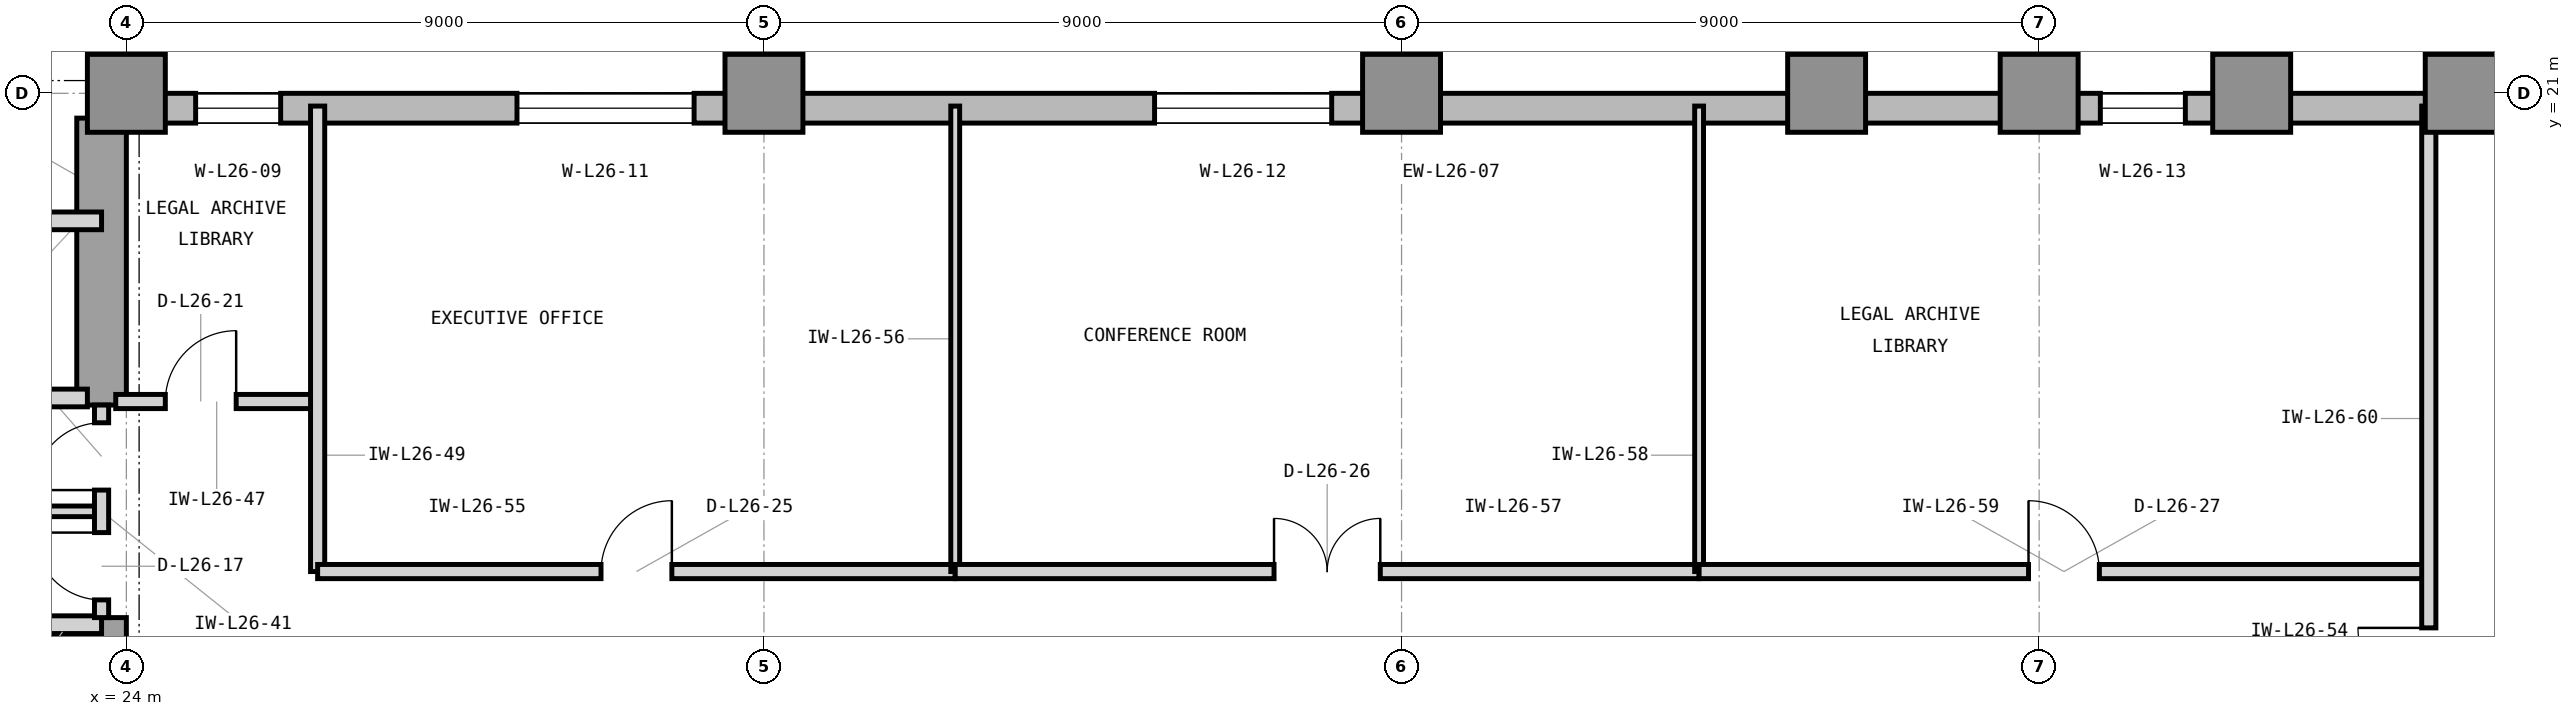
"""IFC4 building model, lengths in metres.
Left out: names, types, materials, properties, quantities, classifications, styles, units other than length and angle.
Written with IfcOpenShell. Run it as: python <this file> out.ifc"""

import sys

from ifc_helpers import new_model, si_unit, direction, frame, frame_2d, origin, origin_2d, place, context, subcontext, project, spatial, rectangle, extrude, element, fill, save


model = new_model("IFC4")
c1 = context("Model", 3, precision=1e-05, world=origin(), true_north=direction((0.0, 1.0)))
c2 = subcontext(c1, "Body", "Model", "MODEL_VIEW")
j1 = project(units=[si_unit("LENGTHUNIT", "METRE"), si_unit("PLANEANGLEUNIT", "RADIAN")], contexts=[c1])
p1 = place(None, origin())
s1 = spatial("IfcSite", under=j1, at=p1, CompositionType="ELEMENT")
p2 = place(p1, origin())
s2 = spatial("IfcBuilding", under=s1, at=p2, CompositionType="ELEMENT")
p3 = place(p2, frame((0.0, 0.0, 112.8)))
s3 = spatial("IfcBuildingStorey", under=s2, at=p3, CompositionType="ELEMENT", Elevation=112.8)
p4 = place(p3, frame((23.65, 10.4, 0.0), z_axis=(0.0, 0.0, 1.0), x_axis=(0.0, 1.0, 0.0)))
e1 = element("IfcWall", 1, at=p4, inside=s3, PredefinedType="SHEAR", context=c2, shape_type="SweptSolid", body=[
    extrude(rectangle(XDim=3.2, YDim=0.7, at=frame_2d((1.6, 0.0))), origin(), (0.0, 0.0, 1.0), 3.9),
])
p5 = place(p3, frame((23.65, 16.6, 0.0), z_axis=(0.0, 0.0, 1.0), x_axis=(0.0, 1.0, 0.0)))
e2 = element("IfcWall", 2, at=p5, inside=s3, PredefinedType="SHEAR", context=c2, shape_type="SweptSolid", body=[
    extrude(rectangle(XDim=4.05, YDim=0.7, at=frame_2d((2.025, 0.0))), origin(), (0.0, 0.0, 1.0), 3.9),
])
for number, where, z_axis, x_axis in (
    (3, (24.0, 21.0, 0.0), (0.0, 0.0, 1.0), (1.0, 0.0, 0.0)),
    (4, (33.0, 21.0, 0.0), (0.0, 0.0, 1.0), (1.0, 0.0, 0.0)),
    (5, (42.0, 21.0, 0.0), (0.0, 0.0, 1.0), (1.0, 0.0, 0.0)),
    (6, (48.0, 21.0, 0.0), (0.0, 0.0, 1.0), (1.0, 0.0, 0.0)),
    (7, (51.0, 21.0, 0.0), (0.0, 0.0, 1.0), (1.0, 0.0, 0.0)),
    (8, (54.0, 21.0, 0.0), (0.0, 0.0, 1.0), (1.0, 0.0, 0.0)),
    (9, (57.0, 21.0, 0.0), (0.0, 0.0, 1.0), (1.0, 0.0, 0.0)),
):
    element("IfcColumn", number, at=place(p3, frame(where, z_axis=z_axis, x_axis=x_axis)), inside=s3, PredefinedType="COLUMN", context=c2, shape_type="SweptSolid", body=[
        extrude(rectangle(XDim=1.1, YDim=1.1, at=origin_2d()), origin(), (0.0, 0.0, 1.0), 3.9),
    ])
p6 = place(p3, frame((61.4, 20.79, 0.0), z_axis=(0.0, 0.0, 1.0), x_axis=(-1.0, 0.0, 0.0)))
e10 = element("IfcWall", 10, at=p6, inside=s3, PredefinedType="STANDARD", context=c2, shape_type="SweptSolid", body=[
    extrude(rectangle(XDim=37.4, YDim=0.42, at=frame_2d((18.7, 0.0))), origin(), (0.0, 0.0, 1.0), 3.7),
])
p7 = place(p6, frame((35.222, 0.0, 0.85)))
e11 = element("IfcOpeningElement", 11, at=p7, cuts=e10, PredefinedType="OPENING", context=c2, shape_type="SweptSolid", body=[
    extrude(rectangle(XDim=1.2, YDim=2.25, at=frame_2d((0.6, 1.125))), frame((0.0, 0.22, 0.0), z_axis=(0.0, -1.0, 0.0), x_axis=(1.0, 0.0, 0.0)), (0.0, 0.0, 1.0), 0.44),
])
p8 = place(p6, frame((29.386, 0.0, 0.85)))
e12 = element("IfcOpeningElement", 12, at=p8, cuts=e10, PredefinedType="OPENING", context=c2, shape_type="SweptSolid", body=[
    extrude(rectangle(XDim=2.5, YDim=2.25, at=frame_2d((1.25, 1.125))), frame((0.0, 0.22, 0.0), z_axis=(0.0, -1.0, 0.0), x_axis=(1.0, 0.0, 0.0)), (0.0, 0.0, 1.0), 0.44),
])
p9 = place(p6, frame((20.386, 0.0, 0.85)))
e13 = element("IfcOpeningElement", 13, at=p9, cuts=e10, PredefinedType="OPENING", context=c2, shape_type="SweptSolid", body=[
    extrude(rectangle(XDim=2.5, YDim=2.25, at=frame_2d((1.25, 1.125))), frame((0.0, 0.22, 0.0), z_axis=(0.0, -1.0, 0.0), x_axis=(1.0, 0.0, 0.0)), (0.0, 0.0, 1.0), 0.44),
])
p10 = place(p6, frame((8.336, 0.0, 0.85)))
e14 = element("IfcOpeningElement", 14, at=p10, cuts=e10, PredefinedType="OPENING", context=c2, shape_type="SweptSolid", body=[
    extrude(rectangle(XDim=1.2, YDim=2.25, at=frame_2d((0.6, 1.125))), frame((0.0, 0.22, 0.0), z_axis=(0.0, -1.0, 0.0), x_axis=(1.0, 0.0, 0.0)), (0.0, 0.0, 1.0), 0.44),
])
p11 = place(p3, frame((23.79, 21.0, 0.0), z_axis=(0.0, 0.0, 1.0), x_axis=(0.0, 1.0, 0.0)))
e15 = element("IfcWall", 15, at=p11, inside=s3, PredefinedType="STANDARD", context=c2, shape_type="SweptSolid", body=[
    extrude(rectangle(XDim=25.4, YDim=0.42, at=frame_2d((12.7, 0.0))), origin(), (0.0, 0.0, 1.0), 3.7),
])
p12 = place(p11, frame((11.45, 0.0, 0.85)))
e16 = element("IfcOpeningElement", 16, at=p12, cuts=e15, PredefinedType="OPENING", context=c2, shape_type="SweptSolid", body=[
    extrude(rectangle(XDim=2.5, YDim=2.25, at=frame_2d((1.25, 1.125))), frame((0.0, 0.22, 0.0), z_axis=(0.0, -1.0, 0.0), x_axis=(1.0, 0.0, 0.0)), (0.0, 0.0, 1.0), 0.44),
])
p13 = place(p3, frame((21.05, 16.7, 0.0), z_axis=(0.0, 0.0, 1.0), x_axis=(1.0, 0.0, 0.0)))
e17 = element("IfcWall", 17, at=p13, inside=s3, PredefinedType="PARTITIONING", context=c2, shape_type="SweptSolid", body=[
    extrude(rectangle(XDim=2.4, YDim=0.25, at=frame_2d((1.2, 0.0))), origin(), (0.0, 0.0, 1.0), 3.227),
])
p14 = place(p3, frame((16.45, 19.2, 0.0), z_axis=(0.0, 0.0, 1.0), x_axis=(1.0, 0.0, 0.0)))
e18 = element("IfcWall", 18, at=p14, inside=s3, PredefinedType="PARTITIONING", context=c2, shape_type="SweptSolid", body=[
    extrude(rectangle(XDim=7.2, YDim=0.25, at=frame_2d((3.6, 0.0))), origin(), (0.0, 0.0, 1.0), 3.69),
])
p15 = place(p3, frame((14.7, 13.5, 0.0), z_axis=(0.0, 0.0, 1.0), x_axis=(1.0, 0.0, 0.0)))
e19 = element("IfcWall", 19, at=p15, inside=s3, PredefinedType="PARTITIONING", context=c2, shape_type="SweptSolid", body=[
    extrude(rectangle(XDim=8.95, YDim=0.25, at=frame_2d((4.475, 0.0))), origin(), (0.0, 0.0, 1.0), 3.227),
])
p16 = place(p3, frame((19.65, 15.1, 0.0), z_axis=(0.0, 0.0, 1.0), x_axis=(1.0, 0.0, 0.0)))
e20 = element("IfcWall", 20, at=p16, inside=s3, PredefinedType="PARTITIONING", context=c2, shape_type="SweptSolid", body=[
    extrude(rectangle(XDim=4.0, YDim=0.15, at=frame_2d((2.0, 0.0))), origin(), (0.0, 0.0, 1.0), 3.69),
])
p17 = place(p3, frame((23.65, 13.6, 0.0), z_axis=(0.0, 0.0, 1.0), x_axis=(0.0, 1.0, 0.0)))
e21 = element("IfcWall", 21, at=p17, inside=s3, PredefinedType="PARTITIONING", context=c2, shape_type="SweptSolid", body=[
    extrude(rectangle(XDim=3.0, YDim=0.2, at=frame_2d((1.5, 0.0))), origin(), (0.0, 0.0, 1.0), 3.69),
])
p18 = place(p17, frame((0.25, 0.0, 0.0)))
e22 = element("IfcOpeningElement", 22, at=p18, cuts=e21, PredefinedType="OPENING", context=c2, shape_type="SweptSolid", body=[
    extrude(rectangle(XDim=0.95, YDim=2.1, at=frame_2d((0.475, 1.05))), frame((0.0, 0.11, 0.0), z_axis=(0.0, -1.0, 0.0), x_axis=(1.0, 0.0, 0.0)), (0.0, 0.0, 1.0), 0.22),
])
p19 = place(p17, frame((1.8, 0.0, 0.0)))
e23 = element("IfcOpeningElement", 23, at=p19, cuts=e21, PredefinedType="OPENING", context=c2, shape_type="SweptSolid", body=[
    extrude(rectangle(XDim=0.95, YDim=2.1, at=frame_2d((0.475, 1.05))), frame((0.0, 0.11, 0.0), z_axis=(0.0, -1.0, 0.0), x_axis=(1.0, 0.0, 0.0)), (0.0, 0.0, 1.0), 0.22),
])
p20 = place(p3, frame((23.85, 16.65, 0.0), z_axis=(0.0, 0.0, 1.0), x_axis=(1.0, 0.0, 0.0)))
e24 = element("IfcWall", 24, at=p20, inside=s3, PredefinedType="PARTITIONING", context=c2, shape_type="SweptSolid", body=[
    extrude(rectangle(XDim=2.85, YDim=0.2, at=frame_2d((1.425, 0.0))), origin(), (0.0, 0.0, 1.0), 3.69),
])
p21 = place(p20, frame((0.7, 0.0, 0.0)))
e25 = element("IfcOpeningElement", 25, at=p21, cuts=e24, PredefinedType="OPENING", context=c2, shape_type="SweptSolid", body=[
    extrude(rectangle(XDim=1.0, YDim=2.15, at=frame_2d((0.5, 1.075))), frame((0.0, 0.11, 0.0), z_axis=(0.0, -1.0, 0.0), x_axis=(1.0, 0.0, 0.0)), (0.0, 0.0, 1.0), 0.22),
])
p22 = place(p3, frame((26.7, 14.25, 0.0), z_axis=(0.0, 0.0, 1.0), x_axis=(0.0, 1.0, 0.0)))
e26 = element("IfcWall", 26, at=p22, inside=s3, PredefinedType="PARTITIONING", context=c2, shape_type="SweptSolid", body=[
    extrude(rectangle(XDim=6.57, YDim=0.2, at=frame_2d((3.285, 0.0))), origin(), (0.0, 0.0, 1.0), 3.69),
])
p23 = place(p3, frame((26.7, 14.25, 0.0), z_axis=(0.0, 0.0, 1.0), x_axis=(1.0, 0.0, 0.0)))
e27 = element("IfcWall", 27, at=p23, inside=s3, PredefinedType="PARTITIONING", context=c2, shape_type="SweptSolid", body=[
    extrude(rectangle(XDim=9.0, YDim=0.2, at=frame_2d((4.5, 0.0))), origin(), (0.0, 0.0, 1.0), 3.69),
])
p24 = place(p23, frame((4.0, 0.0, 0.0)))
e28 = element("IfcOpeningElement", 28, at=p24, cuts=e27, PredefinedType="OPENING", context=c2, shape_type="SweptSolid", body=[
    extrude(rectangle(XDim=1.0, YDim=2.15, at=frame_2d((0.5, 1.075))), frame((0.0, 0.11, 0.0), z_axis=(0.0, -1.0, 0.0), x_axis=(1.0, 0.0, 0.0)), (0.0, 0.0, 1.0), 0.22),
])
p25 = place(p3, frame((35.7, 14.25, 0.0), z_axis=(0.0, 0.0, 1.0), x_axis=(0.0, 1.0, 0.0)))
e29 = element("IfcWall", 29, at=p25, inside=s3, PredefinedType="PARTITIONING", context=c2, shape_type="SweptSolid", body=[
    extrude(rectangle(XDim=6.57, YDim=0.125, at=frame_2d((3.285, 0.0))), origin(), (0.0, 0.0, 1.0), 3.69),
])
p26 = place(p3, frame((35.7, 14.25, 0.0), z_axis=(0.0, 0.0, 1.0), x_axis=(1.0, 0.0, 0.0)))
e30 = element("IfcWall", 30, at=p26, inside=s3, PredefinedType="PARTITIONING", context=c2, shape_type="SweptSolid", body=[
    extrude(rectangle(XDim=10.5, YDim=0.2, at=frame_2d((5.25, 0.0))), origin(), (0.0, 0.0, 1.0), 3.69),
])
p27 = place(p26, frame((4.5, 0.0, 0.0)))
e31 = element("IfcOpeningElement", 31, at=p27, cuts=e30, PredefinedType="OPENING", context=c2, shape_type="SweptSolid", body=[
    extrude(rectangle(XDim=1.5, YDim=2.3, at=frame_2d((0.75, 1.15))), frame((0.0, 0.11, 0.0), z_axis=(0.0, -1.0, 0.0), x_axis=(1.0, 0.0, 0.0)), (0.0, 0.0, 1.0), 0.22),
])
p28 = place(p3, frame((46.2, 14.25, 0.0), z_axis=(0.0, 0.0, 1.0), x_axis=(0.0, 1.0, 0.0)))
e32 = element("IfcWall", 32, at=p28, inside=s3, PredefinedType="PARTITIONING", context=c2, shape_type="SweptSolid", body=[
    extrude(rectangle(XDim=6.57, YDim=0.125, at=frame_2d((3.285, 0.0))), origin(), (0.0, 0.0, 1.0), 3.69),
])
p29 = place(p3, frame((46.2, 14.25, 0.0), z_axis=(0.0, 0.0, 1.0), x_axis=(1.0, 0.0, 0.0)))
e33 = element("IfcWall", 33, at=p29, inside=s3, PredefinedType="PARTITIONING", context=c2, shape_type="SweptSolid", body=[
    extrude(rectangle(XDim=10.3, YDim=0.2, at=frame_2d((5.15, 0.0))), origin(), (0.0, 0.0, 1.0), 3.69),
])
p30 = place(p29, frame((4.65, 0.0, 0.0)))
e34 = element("IfcOpeningElement", 34, at=p30, cuts=e33, PredefinedType="OPENING", context=c2, shape_type="SweptSolid", body=[
    extrude(rectangle(XDim=1.0, YDim=2.15, at=frame_2d((0.5, 1.075))), frame((0.0, 0.11, 0.0), z_axis=(0.0, -1.0, 0.0), x_axis=(1.0, 0.0, 0.0)), (0.0, 0.0, 1.0), 0.22),
])
p31 = place(p3, frame((56.5, 3.18, 0.0), z_axis=(0.0, 0.0, 1.0), x_axis=(0.0, 1.0, 0.0)))
e35 = element("IfcWall", 35, at=p31, inside=s3, PredefinedType="PARTITIONING", context=c2, shape_type="SweptSolid", body=[
    extrude(rectangle(XDim=17.64, YDim=0.2, at=frame_2d((8.82, 0.0))), origin(), (0.0, 0.0, 1.0), 3.69),
])
p32 = place(p31, frame((9.275, 0.0, 0.0)))
e36 = element("IfcOpeningElement", 36, at=p32, cuts=e35, PredefinedType="OPENING", context=c2, shape_type="SweptSolid", body=[
    extrude(rectangle(XDim=1.0, YDim=2.15, at=frame_2d((0.5, 1.075))), frame((0.0, 0.11, 0.0), z_axis=(0.0, -1.0, 0.0), x_axis=(1.0, 0.0, 0.0)), (0.0, 0.0, 1.0), 0.22),
])
p33 = place(p18, origin())
e37 = element("IfcDoor", 37, at=p33, inside=s3, OperationType="SINGLE_SWING_RIGHT", PredefinedType="DOOR", context=c2, shape_type="SweptSolid", body=[
    extrude(rectangle(XDim=0.95, YDim=2.1, at=frame_2d((0.475, 1.05))), frame((0.0, 0.025, 0.0), z_axis=(0.0, -1.0, 0.0), x_axis=(1.0, 0.0, 0.0)), (0.0, 0.0, 1.0), 0.05),
])
fill(e22, e37)
p34 = place(p19, origin())
e38 = element("IfcDoor", 38, at=p34, inside=s3, OperationType="SINGLE_SWING_LEFT", PredefinedType="DOOR", context=c2, shape_type="SweptSolid", body=[
    extrude(rectangle(XDim=0.95, YDim=2.1, at=frame_2d((0.475, 1.05))), frame((0.0, 0.025, 0.0), z_axis=(0.0, -1.0, 0.0), x_axis=(1.0, 0.0, 0.0)), (0.0, 0.0, 1.0), 0.05),
])
fill(e23, e38)
p35 = place(p21, origin())
e39 = element("IfcDoor", 39, at=p35, inside=s3, OperationType="SINGLE_SWING_RIGHT", PredefinedType="DOOR", context=c2, shape_type="SweptSolid", body=[
    extrude(rectangle(XDim=1.0, YDim=2.15, at=frame_2d((0.5, 1.075))), frame((0.0, 0.025, 0.0), z_axis=(0.0, -1.0, 0.0), x_axis=(1.0, 0.0, 0.0)), (0.0, 0.0, 1.0), 0.05),
])
fill(e25, e39)
p36 = place(p24, origin())
e40 = element("IfcDoor", 40, at=p36, inside=s3, OperationType="SINGLE_SWING_RIGHT", PredefinedType="DOOR", context=c2, shape_type="SweptSolid", body=[
    extrude(rectangle(XDim=1.0, YDim=2.15, at=frame_2d((0.5, 1.075))), frame((0.0, 0.025, 0.0), z_axis=(0.0, -1.0, 0.0), x_axis=(1.0, 0.0, 0.0)), (0.0, 0.0, 1.0), 0.05),
])
fill(e28, e40)
p37 = place(p27, origin())
e41 = element("IfcDoor", 41, at=p37, inside=s3, OperationType="DOUBLE_DOOR_SINGLE_SWING", PredefinedType="DOOR", context=c2, shape_type="SweptSolid", body=[
    extrude(rectangle(XDim=1.5, YDim=2.3, at=frame_2d((0.75, 1.15))), frame((0.0, 0.025, 0.0), z_axis=(0.0, -1.0, 0.0), x_axis=(1.0, 0.0, 0.0)), (0.0, 0.0, 1.0), 0.05),
])
fill(e31, e41)
p38 = place(p30, origin())
e42 = element("IfcDoor", 42, at=p38, inside=s3, OperationType="SINGLE_SWING_LEFT", PredefinedType="DOOR", context=c2, shape_type="SweptSolid", body=[
    extrude(rectangle(XDim=1.0, YDim=2.15, at=frame_2d((0.5, 1.075))), frame((0.0, 0.025, 0.0), z_axis=(0.0, -1.0, 0.0), x_axis=(1.0, 0.0, 0.0)), (0.0, 0.0, 1.0), 0.05),
])
fill(e34, e42)
p39 = place(p32, origin())
e43 = element("IfcDoor", 43, at=p39, inside=s3, OperationType="SINGLE_SWING_RIGHT", PredefinedType="DOOR", context=c2, shape_type="SweptSolid", body=[
    extrude(rectangle(XDim=1.0, YDim=2.15, at=frame_2d((0.5, 1.075))), frame((0.0, 0.025, 0.0), z_axis=(0.0, -1.0, 0.0), x_axis=(1.0, 0.0, 0.0)), (0.0, 0.0, 1.0), 0.05),
])
fill(e36, e43)
p40 = place(p7, origin())
e44 = element("IfcWindow", 44, at=p40, inside=s3, PartitioningType="SINGLE_PANEL", PredefinedType="WINDOW", context=c2, shape_type="SweptSolid", body=[
    extrude(rectangle(XDim=1.2, YDim=2.25, at=frame_2d((0.6, 1.125))), frame((0.0, 0.11, 0.0), z_axis=(0.0, -1.0, 0.0), x_axis=(1.0, 0.0, 0.0)), (0.0, 0.0, 1.0), 0.06),
])
fill(e11, e44)
p41 = place(p8, origin())
e45 = element("IfcWindow", 45, at=p41, inside=s3, PartitioningType="SINGLE_PANEL", PredefinedType="WINDOW", context=c2, shape_type="SweptSolid", body=[
    extrude(rectangle(XDim=2.5, YDim=2.25, at=frame_2d((1.25, 1.125))), frame((0.0, 0.11, 0.0), z_axis=(0.0, -1.0, 0.0), x_axis=(1.0, 0.0, 0.0)), (0.0, 0.0, 1.0), 0.06),
])
fill(e12, e45)
p42 = place(p9, origin())
e46 = element("IfcWindow", 46, at=p42, inside=s3, PartitioningType="SINGLE_PANEL", PredefinedType="WINDOW", context=c2, shape_type="SweptSolid", body=[
    extrude(rectangle(XDim=2.5, YDim=2.25, at=frame_2d((1.25, 1.125))), frame((0.0, 0.11, 0.0), z_axis=(0.0, -1.0, 0.0), x_axis=(1.0, 0.0, 0.0)), (0.0, 0.0, 1.0), 0.06),
])
fill(e13, e46)
p43 = place(p10, origin())
e47 = element("IfcWindow", 47, at=p43, inside=s3, PartitioningType="SINGLE_PANEL", PredefinedType="WINDOW", context=c2, shape_type="SweptSolid", body=[
    extrude(rectangle(XDim=1.2, YDim=2.25, at=frame_2d((0.6, 1.125))), frame((0.0, 0.11, 0.0), z_axis=(0.0, -1.0, 0.0), x_axis=(1.0, 0.0, 0.0)), (0.0, 0.0, 1.0), 0.06),
])
fill(e14, e47)
save(model, sys.argv[1])
